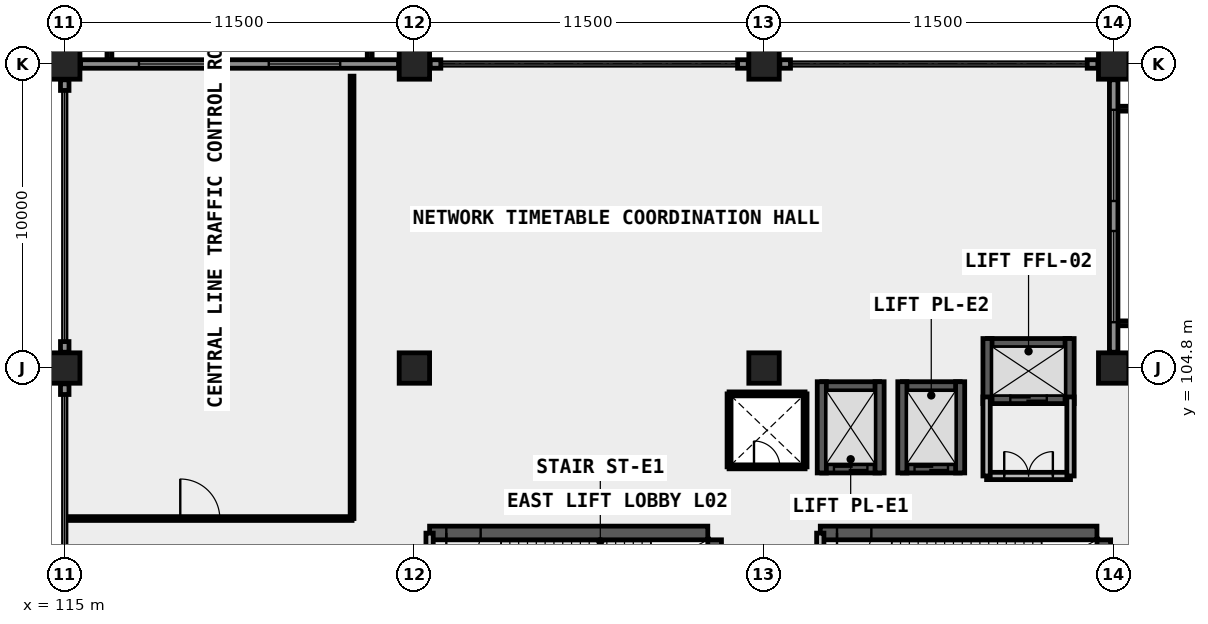
"""IFC4 building model, lengths in metres.
Left out: names, types, materials, properties, quantities, classifications, styles, units other than length and angle.
Written with IfcOpenShell. Run it as: python <this file> out.ifc"""

import sys

from ifc_helpers import new_model, si_unit, direction, frame, frame_2d, origin, origin_2d, place, context, subcontext, project, spatial, rectangle, extrude, element, fill, save


model = new_model("IFC4")
c1 = context("Model", 3, precision=1e-05, world=origin(), true_north=direction((0.0, 1.0)))
c2 = subcontext(c1, "Body", "Model", "MODEL_VIEW")
j1 = project(units=[si_unit("LENGTHUNIT", "METRE"), si_unit("PLANEANGLEUNIT", "RADIAN")], contexts=[c1])
p1 = place(None, origin())
s1 = spatial("IfcSite", under=j1, at=p1, CompositionType="ELEMENT")
p2 = place(p1, origin())
s2 = spatial("IfcBuilding", under=s1, at=p2, CompositionType="ELEMENT")
p3 = place(p2, frame((0.0, 0.0, 8.4)))
s3 = spatial("IfcBuildingStorey", under=s2, at=p3, CompositionType="ELEMENT", Elevation=8.4)
for number, where, z_axis, x_axis in (
    (1, (115.0, 104.8, 0.0), (0.0, 0.0, 1.0), (1.0, 0.0, 0.0)),
    (2, (115.0, 114.8, 0.0), (0.0, 0.0, 1.0), (1.0, 0.0, 0.0)),
    (3, (126.5, 104.8, 0.0), (0.0, 0.0, 1.0), (1.0, 0.0, 0.0)),
    (4, (126.5, 114.8, 0.0), (0.0, 0.0, 1.0), (1.0, 0.0, 0.0)),
    (5, (138.0, 104.8, 0.0), (0.0, 0.0, 1.0), (1.0, 0.0, 0.0)),
    (6, (138.0, 114.8, 0.0), (0.0, 0.0, 1.0), (1.0, 0.0, 0.0)),
    (7, (149.5, 104.8, 0.0), (0.0, 0.0, 1.0), (1.0, 0.0, 0.0)),
    (8, (149.5, 114.8, 0.0), (0.0, 0.0, 1.0), (1.0, 0.0, 0.0)),
):
    element("IfcColumn", number, at=place(p3, frame(where, z_axis=z_axis, x_axis=x_axis)), inside=s3, PredefinedType="COLUMN", context=c2, shape_type="SweptSolid", body=[
        extrude(rectangle(XDim=1.0, YDim=1.0, at=origin_2d()), origin(), (0.0, 0.0, 1.0), 5.4),
    ])
p4 = place(p3, frame((145.35, 103.78, 0.0), z_axis=(0.0, 0.0, 1.0), x_axis=(1.0, 0.0, 0.0)))
e9 = element("IfcWall", 9, at=p4, inside=s3, PredefinedType="SHEAR", context=c2, shape_type="SweptSolid", body=[
    extrude(rectangle(XDim=2.7, YDim=0.3, at=frame_2d((1.35, 0.0))), origin(), (0.0, 0.0, 1.0), 5.4),
])
p5 = place(p4, frame((0.75, 0.0, 0.0)))
e10 = element("IfcOpeningElement", 10, at=p5, cuts=e9, PredefinedType="OPENING", context=c2, shape_type="SweptSolid", body=[
    extrude(rectangle(XDim=1.2, YDim=2.15, at=frame_2d((0.6, 1.075))), frame((0.0, 0.16, 0.0), z_axis=(0.0, -1.0, 0.0), x_axis=(1.0, 0.0, 0.0)), (0.0, 0.0, 1.0), 0.32),
])
p6 = place(p3, frame((145.35, 105.62, 0.0), z_axis=(0.0, 0.0, 1.0), x_axis=(1.0, 0.0, 0.0)))
e11 = element("IfcWall", 11, at=p6, inside=s3, PredefinedType="SHEAR", context=c2, shape_type="SweptSolid", body=[
    extrude(rectangle(XDim=2.7, YDim=0.3, at=frame_2d((1.35, 0.0))), origin(), (0.0, 0.0, 1.0), 5.4),
])
for number, where, z_axis, x_axis in (
    (12, (145.35, 103.63, 0.0), (0.0, 0.0, 1.0), (0.0, 1.0, 0.0)),
    (13, (148.05, 103.63, 0.0), (0.0, 0.0, 1.0), (0.0, 1.0, 0.0)),
):
    element("IfcWall", number, at=place(p3, frame(where, z_axis=z_axis, x_axis=x_axis)), inside=s3, PredefinedType="SHEAR", context=c2, shape_type="SweptSolid", body=[
        extrude(rectangle(XDim=2.14, YDim=0.3, at=frame_2d((1.07, 0.0))), origin(), (0.0, 0.0, 1.0), 5.4),
    ])
p7 = place(p3, frame((139.9, 101.5, 0.0), z_axis=(0.0, 0.0, 1.0), x_axis=(1.0, 0.0, 0.0)))
e14 = element("IfcWall", 14, at=p7, inside=s3, PredefinedType="SHEAR", context=c2, shape_type="SweptSolid", body=[
    extrude(rectangle(XDim=1.9, YDim=0.3, at=frame_2d((0.95, 0.0))), origin(), (0.0, 0.0, 1.0), 5.4),
])
p8 = place(p7, frame((0.4, 0.0, 0.0)))
e15 = element("IfcOpeningElement", 15, at=p8, cuts=e14, PredefinedType="OPENING", context=c2, shape_type="SweptSolid", body=[
    extrude(rectangle(XDim=1.1, YDim=2.15, at=frame_2d((0.55, 1.075))), frame((0.0, 0.16, 0.0), z_axis=(0.0, -1.0, 0.0), x_axis=(1.0, 0.0, 0.0)), (0.0, 0.0, 1.0), 0.32),
])
p9 = place(p3, frame((139.9, 104.2, 0.0), z_axis=(0.0, 0.0, 1.0), x_axis=(1.0, 0.0, 0.0)))
e16 = element("IfcWall", 16, at=p9, inside=s3, PredefinedType="SHEAR", context=c2, shape_type="SweptSolid", body=[
    extrude(rectangle(XDim=1.9, YDim=0.3, at=frame_2d((0.95, 0.0))), origin(), (0.0, 0.0, 1.0), 5.4),
])
for number, where, z_axis, x_axis in (
    (17, (139.9, 101.35, 0.0), (0.0, 0.0, 1.0), (0.0, 1.0, 0.0)),
    (18, (141.8, 101.35, 0.0), (0.0, 0.0, 1.0), (0.0, 1.0, 0.0)),
):
    element("IfcWall", number, at=place(p3, frame(where, z_axis=z_axis, x_axis=x_axis)), inside=s3, PredefinedType="SHEAR", context=c2, shape_type="SweptSolid", body=[
        extrude(rectangle(XDim=3.0, YDim=0.3, at=frame_2d((1.5, 0.0))), origin(), (0.0, 0.0, 1.0), 5.4),
    ])
p10 = place(p3, frame((142.55, 101.5, 0.0), z_axis=(0.0, 0.0, 1.0), x_axis=(1.0, 0.0, 0.0)))
e19 = element("IfcWall", 19, at=p10, inside=s3, PredefinedType="SHEAR", context=c2, shape_type="SweptSolid", body=[
    extrude(rectangle(XDim=1.9, YDim=0.3, at=frame_2d((0.95, 0.0))), origin(), (0.0, 0.0, 1.0), 5.4),
])
p11 = place(p10, frame((0.4, 0.0, 0.0)))
e20 = element("IfcOpeningElement", 20, at=p11, cuts=e19, PredefinedType="OPENING", context=c2, shape_type="SweptSolid", body=[
    extrude(rectangle(XDim=1.1, YDim=2.15, at=frame_2d((0.55, 1.075))), frame((0.0, 0.16, 0.0), z_axis=(0.0, -1.0, 0.0), x_axis=(1.0, 0.0, 0.0)), (0.0, 0.0, 1.0), 0.32),
])
p12 = place(p3, frame((142.55, 104.2, 0.0), z_axis=(0.0, 0.0, 1.0), x_axis=(1.0, 0.0, 0.0)))
e21 = element("IfcWall", 21, at=p12, inside=s3, PredefinedType="SHEAR", context=c2, shape_type="SweptSolid", body=[
    extrude(rectangle(XDim=1.9, YDim=0.3, at=frame_2d((0.95, 0.0))), origin(), (0.0, 0.0, 1.0), 5.4),
])
for number, where, z_axis, x_axis in (
    (22, (142.55, 101.35, 0.0), (0.0, 0.0, 1.0), (0.0, 1.0, 0.0)),
    (23, (144.45, 101.35, 0.0), (0.0, 0.0, 1.0), (0.0, 1.0, 0.0)),
):
    element("IfcWall", number, at=place(p3, frame(where, z_axis=z_axis, x_axis=x_axis)), inside=s3, PredefinedType="SHEAR", context=c2, shape_type="SweptSolid", body=[
        extrude(rectangle(XDim=3.0, YDim=0.3, at=frame_2d((1.5, 0.0))), origin(), (0.0, 0.0, 1.0), 5.4),
    ])
p13 = place(p3, frame((127.0, 99.375, 0.0), z_axis=(0.0, 0.0, 1.0), x_axis=(1.0, 0.0, 0.0)))
e24 = element("IfcWall", 24, at=p13, inside=s3, PredefinedType="SHEAR", context=c2, shape_type="SweptSolid", body=[
    extrude(rectangle(XDim=9.15, YDim=0.45, at=frame_2d((4.575, 0.0))), origin(), (0.0, 0.0, 1.0), 5.4),
])
p14 = place(p13, frame((0.55, 0.0, 0.0)))
e25 = element("IfcOpeningElement", 25, at=p14, cuts=e24, PredefinedType="OPENING", context=c2, shape_type="SweptSolid", body=[
    extrude(rectangle(XDim=1.13, YDim=2.15, at=frame_2d((0.565, 1.075))), frame((0.0, 0.235, 0.0), z_axis=(0.0, -1.0, 0.0), x_axis=(1.0, 0.0, 0.0)), (0.0, 0.0, 1.0), 0.47),
])
p15 = place(p3, frame((136.375, 95.55, 0.0), z_axis=(0.0, 0.0, 1.0), x_axis=(0.0, 1.0, 0.0)))
e26 = element("IfcWall", 26, at=p15, inside=s3, PredefinedType="SHEAR", context=c2, shape_type="SweptSolid", body=[
    extrude(rectangle(XDim=3.6, YDim=0.45, at=frame_2d((1.8, 0.0))), origin(), (0.0, 0.0, 1.0), 5.4),
])
p16 = place(p3, frame((139.85, 99.375, 0.0), z_axis=(0.0, 0.0, 1.0), x_axis=(1.0, 0.0, 0.0)))
e27 = element("IfcWall", 27, at=p16, inside=s3, PredefinedType="SHEAR", context=c2, shape_type="SweptSolid", body=[
    extrude(rectangle(XDim=9.1, YDim=0.45, at=frame_2d((4.55, 0.0))), origin(), (0.0, 0.0, 1.0), 5.4),
])
p17 = place(p16, frame((0.55, 0.0, 0.0)))
e28 = element("IfcOpeningElement", 28, at=p17, cuts=e27, PredefinedType="OPENING", context=c2, shape_type="SweptSolid", body=[
    extrude(rectangle(XDim=1.13, YDim=2.15, at=frame_2d((0.565, 1.075))), frame((0.0, 0.235, 0.0), z_axis=(0.0, -1.0, 0.0), x_axis=(1.0, 0.0, 0.0)), (0.0, 0.0, 1.0), 0.47),
])
p18 = place(p3, frame((149.175, 95.32, 0.0), z_axis=(0.0, 0.0, 1.0), x_axis=(0.0, 1.0, 0.0)))
e29 = element("IfcWall", 29, at=p18, inside=s3, PredefinedType="SHEAR", context=c2, shape_type="SweptSolid", body=[
    extrude(rectangle(XDim=3.83, YDim=0.45, at=frame_2d((1.915, 0.0))), origin(), (0.0, 0.0, 1.0), 5.4),
])
p19 = place(p3, frame((149.5, 105.32, 0.0), z_axis=(0.0, 0.0, 1.0), x_axis=(0.0, 1.0, 0.0)))
e30 = element("IfcWall", 30, at=p19, inside=s3, PredefinedType="SOLIDWALL", context=c2, shape_type="SweptSolid", body=[
    extrude(rectangle(XDim=8.96, YDim=0.28, at=frame_2d((4.48, 0.0))), origin(), (0.0, 0.0, 1.0), 4.35),
])
p20 = place(p19, frame((0.987, 0.0, 0.85)))
e31 = element("IfcOpeningElement", 31, at=p20, cuts=e30, PredefinedType="OPENING", context=c2, shape_type="SweptSolid", body=[
    extrude(rectangle(XDim=3.0, YDim=2.0, at=frame_2d((1.5, 1.0))), frame((0.0, 0.15, 0.0), z_axis=(0.0, -1.0, 0.0), x_axis=(1.0, 0.0, 0.0)), (0.0, 0.0, 1.0), 0.3),
])
p21 = place(p19, frame((4.973, 0.0, 0.85)))
e32 = element("IfcOpeningElement", 32, at=p21, cuts=e30, PredefinedType="OPENING", context=c2, shape_type="SweptSolid", body=[
    extrude(rectangle(XDim=3.0, YDim=2.0, at=frame_2d((1.5, 1.0))), frame((0.0, 0.15, 0.0), z_axis=(0.0, -1.0, 0.0), x_axis=(1.0, 0.0, 0.0)), (0.0, 0.0, 1.0), 0.3),
])
p22 = place(p3, frame((115.52, 114.8, 0.0), z_axis=(0.0, 0.0, 1.0), x_axis=(1.0, 0.0, 0.0)))
e33 = element("IfcWall", 33, at=p22, inside=s3, PredefinedType="SOLIDWALL", context=c2, shape_type="SweptSolid", body=[
    extrude(rectangle(XDim=10.46, YDim=0.28, at=frame_2d((5.23, 0.0))), origin(), (0.0, 0.0, 1.0), 4.35),
])
p23 = place(p22, frame((1.92, 0.0, 0.85)))
e34 = element("IfcOpeningElement", 34, at=p23, cuts=e33, PredefinedType="OPENING", context=c2, shape_type="SweptSolid", body=[
    extrude(rectangle(XDim=2.35, YDim=2.05, at=frame_2d((1.175, 1.025))), frame((0.0, 0.15, 0.0), z_axis=(0.0, -1.0, 0.0), x_axis=(1.0, 0.0, 0.0)), (0.0, 0.0, 1.0), 0.3),
])
p24 = place(p22, frame((6.19, 0.0, 0.85)))
e35 = element("IfcOpeningElement", 35, at=p24, cuts=e33, PredefinedType="OPENING", context=c2, shape_type="SweptSolid", body=[
    extrude(rectangle(XDim=2.35, YDim=2.05, at=frame_2d((1.175, 1.025))), frame((0.0, 0.15, 0.0), z_axis=(0.0, -1.0, 0.0), x_axis=(1.0, 0.0, 0.0)), (0.0, 0.0, 1.0), 0.3),
])
for number, where, z_axis, x_axis in (
    (36, (127.02, 114.8, 0.0), (0.0, 0.0, 1.0), (1.0, 0.0, 0.0)),
    (37, (137.13, 114.8, 0.0), (0.0, 0.0, 1.0), (1.0, 0.0, 0.0)),
    (38, (138.52, 114.8, 0.0), (0.0, 0.0, 1.0), (1.0, 0.0, 0.0)),
    (39, (148.63, 114.8, 0.0), (0.0, 0.0, 1.0), (1.0, 0.0, 0.0)),
    (40, (115.0, 103.93, 0.0), (0.0, 0.0, 1.0), (0.0, 1.0, 0.0)),
):
    element("IfcWall", number, at=place(p3, frame(where, z_axis=z_axis, x_axis=x_axis)), inside=s3, PredefinedType="SOLIDWALL", context=c2, shape_type="SweptSolid", body=[
        extrude(rectangle(XDim=0.35, YDim=0.28, at=frame_2d((0.175, 0.0))), origin(), (0.0, 0.0, 1.0), 5.13),
    ])
p25 = place(p3, frame((115.0, 105.32, 0.0), z_axis=(0.0, 0.0, 1.0), x_axis=(0.0, 1.0, 0.0)))
e41 = element("IfcWall", 41, at=p25, inside=s3, PredefinedType="SOLIDWALL", context=c2, shape_type="SweptSolid", body=[
    extrude(rectangle(XDim=0.35, YDim=0.28, at=frame_2d((0.175, 0.0))), origin(), (0.0, 0.0, 1.0), 5.13),
])
p26 = place(p3, frame((115.0, 113.93, 0.0), z_axis=(0.0, 0.0, 1.0), x_axis=(0.0, 1.0, 0.0)))
e42 = element("IfcWall", 42, at=p26, inside=s3, PredefinedType="SOLIDWALL", context=c2, shape_type="SweptSolid", body=[
    extrude(rectangle(XDim=0.35, YDim=0.28, at=frame_2d((0.175, 0.0))), origin(), (0.0, 0.0, 1.0), 5.13),
])
p27 = place(p3, frame((127.0, 95.33, 0.0), z_axis=(0.0, 0.0, 1.0), x_axis=(0.0, 1.0, 0.0)))
e43 = element("IfcWall", 43, at=p27, inside=s3, PredefinedType="SOLIDWALL", context=c2, shape_type="SweptSolid", body=[
    extrude(rectangle(XDim=4.04, YDim=0.24, at=frame_2d((2.02, 0.0))), origin(), (0.0, 0.0, 1.0), 5.12),
])
p28 = place(p27, frame((1.45, 0.0, 0.0)))
e44 = element("IfcOpeningElement", 44, at=p28, cuts=e43, PredefinedType="OPENING", context=c2, shape_type="SweptSolid", body=[
    extrude(rectangle(XDim=1.13, YDim=2.15, at=frame_2d((0.565, 1.075))), frame((0.0, 0.13, 0.0), z_axis=(0.0, -1.0, 0.0), x_axis=(1.0, 0.0, 0.0)), (0.0, 0.0, 1.0), 0.26),
])
p29 = place(p3, frame((139.85, 95.33, 0.0), z_axis=(0.0, 0.0, 1.0), x_axis=(0.0, 1.0, 0.0)))
e45 = element("IfcWall", 45, at=p29, inside=s3, PredefinedType="SOLIDWALL", context=c2, shape_type="SweptSolid", body=[
    extrude(rectangle(XDim=4.04, YDim=0.24, at=frame_2d((2.02, 0.0))), origin(), (0.0, 0.0, 1.0), 5.12),
])
p30 = place(p29, frame((1.45, 0.0, 0.0)))
e46 = element("IfcOpeningElement", 46, at=p30, cuts=e45, PredefinedType="OPENING", context=c2, shape_type="SweptSolid", body=[
    extrude(rectangle(XDim=1.13, YDim=2.15, at=frame_2d((0.565, 1.075))), frame((0.0, 0.13, 0.0), z_axis=(0.0, -1.0, 0.0), x_axis=(1.0, 0.0, 0.0)), (0.0, 0.0, 1.0), 0.26),
])
p31 = place(p3, frame((145.32, 101.25, 0.0), z_axis=(0.0, 0.0, 1.0), x_axis=(1.0, 0.0, 0.0)))
e47 = element("IfcWall", 47, at=p31, inside=s3, PredefinedType="SOLIDWALL", context=c2, shape_type="SweptSolid", body=[
    extrude(rectangle(XDim=2.76, YDim=0.24, at=frame_2d((1.38, 0.0))), origin(), (0.0, 0.0, 1.0), 5.12),
])
p32 = place(p31, frame((0.58, 0.0, 0.0)))
e48 = element("IfcOpeningElement", 48, at=p32, cuts=e47, PredefinedType="OPENING", context=c2, shape_type="SweptSolid", body=[
    extrude(rectangle(XDim=1.6, YDim=2.15, at=frame_2d((0.8, 1.075))), frame((0.0, 0.13, 0.0), z_axis=(0.0, -1.0, 0.0), x_axis=(1.0, 0.0, 0.0)), (0.0, 0.0, 1.0), 0.26),
])
for number, where, z_axis, x_axis in (
    (49, (145.32, 101.25, 0.0), (0.0, 0.0, 1.0), (0.0, 1.0, 0.0)),
    (50, (148.08, 101.25, 0.0), (0.0, 0.0, 1.0), (0.0, 1.0, 0.0)),
):
    element("IfcWall", number, at=place(p3, frame(where, z_axis=z_axis, x_axis=x_axis)), inside=s3, PredefinedType="SOLIDWALL", context=c2, shape_type="SweptSolid", body=[
        extrude(rectangle(XDim=2.6, YDim=0.24, at=frame_2d((1.3, 0.0))), origin(), (0.0, 0.0, 1.0), 5.12),
    ])
p33 = place(p3, frame((136.85, 101.55, 0.0), z_axis=(0.0, 0.0, 1.0), x_axis=(1.0, 0.0, 0.0)))
e51 = element("IfcWall", 51, at=p33, inside=s3, PredefinedType="PLUMBINGWALL", context=c2, shape_type="SweptSolid", body=[
    extrude(rectangle(XDim=2.5, YDim=0.13, at=frame_2d((1.25, 0.0))), origin(), (0.0, 0.0, 1.0), 5.12),
])
p34 = place(p33, frame((0.82, 0.0, 0.0)))
e52 = element("IfcOpeningElement", 52, at=p34, cuts=e51, PredefinedType="OPENING", context=c2, shape_type="SweptSolid", body=[
    extrude(rectangle(XDim=0.85, YDim=2.0, at=frame_2d((0.425, 1.0))), frame((0.0, 0.075, 0.0), z_axis=(0.0, -1.0, 0.0), x_axis=(1.0, 0.0, 0.0)), (0.0, 0.0, 1.0), 0.15),
])
for number, where, z_axis, x_axis in (
    (53, (136.85, 101.55, 0.0), (0.0, 0.0, 1.0), (0.0, 1.0, 0.0)),
    (54, (139.35, 101.55, 0.0), (0.0, 0.0, 1.0), (0.0, 1.0, 0.0)),
):
    element("IfcWall", number, at=place(p3, frame(where, z_axis=z_axis, x_axis=x_axis)), inside=s3, PredefinedType="PLUMBINGWALL", context=c2, shape_type="SweptSolid", body=[
        extrude(rectangle(XDim=2.4, YDim=0.13, at=frame_2d((1.2, 0.0))), origin(), (0.0, 0.0, 1.0), 5.12),
    ])
p35 = place(p3, frame((136.85, 103.95, 0.0), z_axis=(0.0, 0.0, 1.0), x_axis=(1.0, 0.0, 0.0)))
e55 = element("IfcWall", 55, at=p35, inside=s3, PredefinedType="PLUMBINGWALL", context=c2, shape_type="SweptSolid", body=[
    extrude(rectangle(XDim=2.5, YDim=0.13, at=frame_2d((1.25, 0.0))), origin(), (0.0, 0.0, 1.0), 5.12),
])
p36 = place(p3, frame((115.16, 99.85, 0.0), z_axis=(0.0, 0.0, 1.0), x_axis=(1.0, 0.0, 0.0)))
e56 = element("IfcWall", 56, at=p36, inside=s3, PredefinedType="MOVABLE", context=c2, shape_type="SweptSolid", body=[
    extrude(rectangle(XDim=9.29, YDim=0.125, at=frame_2d((4.645, 0.0))), origin(), (0.0, 0.0, 1.0), 5.12),
])
p37 = place(p36, frame((3.64, 0.0, 0.0)))
e57 = element("IfcOpeningElement", 57, at=p37, cuts=e56, PredefinedType="OPENING", context=c2, shape_type="SweptSolid", body=[
    extrude(rectangle(XDim=1.3, YDim=2.2, at=frame_2d((0.65, 1.1))), frame((0.0, 0.073, 0.0), z_axis=(0.0, -1.0, 0.0), x_axis=(1.0, 0.0, 0.0)), (0.0, 0.0, 1.0), 0.145),
])
p38 = place(p3, frame((124.45, 99.85, 0.0), z_axis=(0.0, 0.0, 1.0), x_axis=(0.0, 1.0, 0.0)))
e58 = element("IfcWall", 58, at=p38, inside=s3, PredefinedType="MOVABLE", context=c2, shape_type="SweptSolid", body=[
    extrude(rectangle(XDim=14.55, YDim=0.125, at=frame_2d((7.275, 0.0))), origin(), (0.0, 0.0, 1.0), 5.12),
])
p39 = place(p20, origin())
e59 = element("IfcWindow", 59, at=p39, inside=s3, PartitioningType="SINGLE_PANEL", PredefinedType="WINDOW", context=c2, shape_type="SweptSolid", body=[
    extrude(rectangle(XDim=3.0, YDim=2.0, at=frame_2d((1.5, 1.0))), frame((0.0, 0.03, 0.0), z_axis=(0.0, -1.0, 0.0), x_axis=(1.0, 0.0, 0.0)), (0.0, 0.0, 1.0), 0.06),
])
fill(e31, e59)
p40 = place(p21, origin())
e60 = element("IfcWindow", 60, at=p40, inside=s3, PartitioningType="SINGLE_PANEL", PredefinedType="WINDOW", context=c2, shape_type="SweptSolid", body=[
    extrude(rectangle(XDim=3.0, YDim=2.0, at=frame_2d((1.5, 1.0))), frame((0.0, 0.03, 0.0), z_axis=(0.0, -1.0, 0.0), x_axis=(1.0, 0.0, 0.0)), (0.0, 0.0, 1.0), 0.06),
])
fill(e32, e60)
p41 = place(p23, origin())
e61 = element("IfcWindow", 61, at=p41, inside=s3, PartitioningType="SINGLE_PANEL", PredefinedType="WINDOW", context=c2, shape_type="SweptSolid", body=[
    extrude(rectangle(XDim=2.35, YDim=2.05, at=frame_2d((1.175, 1.025))), frame((0.0, 0.03, 0.0), z_axis=(0.0, -1.0, 0.0), x_axis=(1.0, 0.0, 0.0)), (0.0, 0.0, 1.0), 0.06),
])
fill(e34, e61)
p42 = place(p24, origin())
e62 = element("IfcWindow", 62, at=p42, inside=s3, PartitioningType="SINGLE_PANEL", PredefinedType="WINDOW", context=c2, shape_type="SweptSolid", body=[
    extrude(rectangle(XDim=2.35, YDim=2.05, at=frame_2d((1.175, 1.025))), frame((0.0, 0.03, 0.0), z_axis=(0.0, -1.0, 0.0), x_axis=(1.0, 0.0, 0.0)), (0.0, 0.0, 1.0), 0.06),
])
fill(e35, e62)
p43 = place(p5, origin())
e63 = element("IfcDoor", 63, at=p43, inside=s3, OperationType="SLIDING_TO_RIGHT", PredefinedType="DOOR", context=c2, shape_type="SweptSolid", body=[
    extrude(rectangle(XDim=1.2, YDim=2.15, at=frame_2d((0.6, 1.075))), frame((0.0, 0.025, 0.0), z_axis=(0.0, -1.0, 0.0), x_axis=(1.0, 0.0, 0.0)), (0.0, 0.0, 1.0), 0.05),
])
fill(e10, e63)
p44 = place(p8, origin())
e64 = element("IfcDoor", 64, at=p44, inside=s3, OperationType="SLIDING_TO_LEFT", PredefinedType="DOOR", context=c2, shape_type="SweptSolid", body=[
    extrude(rectangle(XDim=1.1, YDim=2.15, at=frame_2d((0.55, 1.075))), frame((0.0, 0.025, 0.0), z_axis=(0.0, -1.0, 0.0), x_axis=(1.0, 0.0, 0.0)), (0.0, 0.0, 1.0), 0.05),
])
fill(e15, e64)
p45 = place(p11, origin())
e65 = element("IfcDoor", 65, at=p45, inside=s3, OperationType="SLIDING_TO_LEFT", PredefinedType="DOOR", context=c2, shape_type="SweptSolid", body=[
    extrude(rectangle(XDim=1.1, YDim=2.15, at=frame_2d((0.55, 1.075))), frame((0.0, 0.025, 0.0), z_axis=(0.0, -1.0, 0.0), x_axis=(1.0, 0.0, 0.0)), (0.0, 0.0, 1.0), 0.05),
])
fill(e20, e65)
p46 = place(p14, frame((0.565, 0.0, 0.0), z_axis=(0.0, 0.0, 1.0), x_axis=(-1.0, 0.0, 0.0)))
e66 = element("IfcDoor", 66, at=p46, inside=s3, OperationType="SINGLE_SWING_LEFT", PredefinedType="DOOR", context=c2, shape_type="SweptSolid", body=[
    extrude(rectangle(XDim=1.13, YDim=2.15, at=frame_2d((0.0, 1.075))), frame((0.0, 0.025, 0.0), z_axis=(0.0, -1.0, 0.0), x_axis=(1.0, 0.0, 0.0)), (0.0, 0.0, 1.0), 0.05),
])
fill(e25, e66)
p47 = place(p17, frame((0.565, 0.0, 0.0), z_axis=(0.0, 0.0, 1.0), x_axis=(-1.0, 0.0, 0.0)))
e67 = element("IfcDoor", 67, at=p47, inside=s3, OperationType="SINGLE_SWING_LEFT", PredefinedType="DOOR", context=c2, shape_type="SweptSolid", body=[
    extrude(rectangle(XDim=1.13, YDim=2.15, at=frame_2d((0.0, 1.075))), frame((0.0, 0.025, 0.0), z_axis=(0.0, -1.0, 0.0), x_axis=(1.0, 0.0, 0.0)), (0.0, 0.0, 1.0), 0.05),
])
fill(e28, e67)
p48 = place(p32, origin())
e68 = element("IfcDoor", 68, at=p48, inside=s3, OperationType="DOUBLE_DOOR_SINGLE_SWING", PredefinedType="DOOR", context=c2, shape_type="SweptSolid", body=[
    extrude(rectangle(XDim=1.6, YDim=2.15, at=frame_2d((0.8, 1.075))), frame((0.0, 0.025, 0.0), z_axis=(0.0, -1.0, 0.0), x_axis=(1.0, 0.0, 0.0)), (0.0, 0.0, 1.0), 0.05),
])
fill(e48, e68)
p49 = place(p34, origin())
e69 = element("IfcDoor", 69, at=p49, inside=s3, OperationType="SINGLE_SWING_LEFT", PredefinedType="TRAPDOOR", context=c2, shape_type="SweptSolid", body=[
    extrude(rectangle(XDim=0.85, YDim=2.0, at=frame_2d((0.425, 1.0))), frame((0.0, 0.025, 0.0), z_axis=(0.0, -1.0, 0.0), x_axis=(1.0, 0.0, 0.0)), (0.0, 0.0, 1.0), 0.05),
])
fill(e52, e69)
p50 = place(p37, origin())
e70 = element("IfcDoor", 70, at=p50, inside=s3, OperationType="SINGLE_SWING_LEFT", PredefinedType="DOOR", context=c2, shape_type="SweptSolid", body=[
    extrude(rectangle(XDim=1.3, YDim=2.2, at=frame_2d((0.65, 1.1))), frame((0.0, 0.025, 0.0), z_axis=(0.0, -1.0, 0.0), x_axis=(1.0, 0.0, 0.0)), (0.0, 0.0, 1.0), 0.05),
])
fill(e57, e70)
save(model, sys.argv[1])
